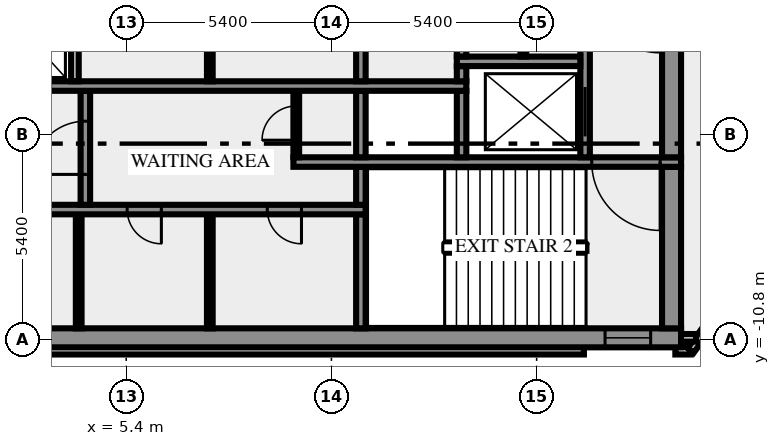
"""IFC4 building model, lengths in metres.
Left out: names, types, materials, properties, quantities, classifications, styles, units other than length and angle.
Written with IfcOpenShell. Run it as: python <this file> out.ifc"""

import sys

from ifc_helpers import new_model, si_unit, direction, frame, frame_2d, origin, place, context, subcontext, project, spatial, rectangle, extrude, element, fill, save


model = new_model("IFC4")
c1 = context("Model", 3, precision=1e-05, world=origin(), true_north=direction((0.0, 1.0)))
c2 = subcontext(c1, "Body", "Model", "MODEL_VIEW")
j1 = project(units=[si_unit("LENGTHUNIT", "METRE"), si_unit("PLANEANGLEUNIT", "RADIAN")], contexts=[c1])
p1 = place(None, origin())
s1 = spatial("IfcSite", under=j1, at=p1, CompositionType="ELEMENT")
p2 = place(p1, origin())
s2 = spatial("IfcBuilding", under=s1, at=p2, CompositionType="ELEMENT")
p3 = place(p2, frame((0.0, 0.0, 253.0)))
s3 = spatial("IfcBuildingStorey", under=s2, at=p3, CompositionType="ELEMENT", Elevation=253.0)
p4 = place(p3, frame((-17.444, -11.088, 0.0), z_axis=(0.0, 0.0, 1.0), x_axis=(1.0, 0.0, 0.0)))
e1 = element("IfcWall", 1, at=p4, inside=s3, PredefinedType="SOLIDWALL", context=c2, shape_type="SweptSolid", body=[
    extrude(rectangle(XDim=34.888, YDim=0.2, at=frame_2d((17.444, 0.0))), origin(), (0.0, 0.0, 1.0), 3.65),
])
p5 = place(p3, frame((19.85, -11.088, 0.0), z_axis=(0.0, 0.0, 1.0), x_axis=(1.0, 0.0, 0.0)))
e2 = element("IfcWall", 2, at=p5, inside=s3, PredefinedType="SOLIDWALL", context=c2, shape_type="SweptSolid", body=[
    extrude(rectangle(XDim=0.406, YDim=0.2, at=frame_2d((0.203, 0.0))), origin(), (0.0, 0.0, 1.0), 3.65),
])
p6 = place(p3, frame((20.253, -11.083, 0.0), z_axis=(0.0, 0.0, 1.0), x_axis=(0.587766567315, 0.809030569476, 0.0)))
e3 = element("IfcWall", 3, at=p6, inside=s3, PredefinedType="SOLIDWALL", context=c2, shape_type="SweptSolid", body=[
    extrude(rectangle(XDim=2.688, YDim=0.2, at=frame_2d((1.344, 0.0))), origin(), (0.0, 0.0, 1.0), 3.65),
])
p7 = place(p3, frame((19.98, -10.75, 0.0), z_axis=(0.0, 0.0, 1.0), x_axis=(1.0, 0.0, 0.0)))
e4 = element("IfcWall", 4, at=p7, inside=s3, PredefinedType="SOLIDWALL", context=c2, shape_type="SweptSolid", body=[
    extrude(rectangle(XDim=0.417, YDim=0.2, at=frame_2d((0.208, 0.0))), origin(), (0.0, 0.0, 1.0), 3.65),
])
p8 = place(p3, frame((-20.0, -10.75, 0.0), z_axis=(0.0, 0.0, 1.0), x_axis=(1.0, 0.0, 0.0)))
e5 = element("IfcWall", 5, at=p8, inside=s3, PredefinedType="SHEAR", context=c2, shape_type="SweptSolid", body=[
    extrude(rectangle(XDim=40.0, YDim=0.5, at=frame_2d((20.0, 0.0))), origin(), (0.0, 0.0, 1.0), 3.65),
])
p9 = place(p8, frame((0.8, 0.0, 1.0)))
e6 = element("IfcOpeningElement", 6, at=p9, cuts=e5, PredefinedType="OPENING", context=c2, shape_type="SweptSolid", body=[
    extrude(rectangle(XDim=1.2, YDim=1.2, at=frame_2d((0.6, 0.6))), frame((0.0, 0.26, 0.0), z_axis=(0.0, -1.0, 0.0), x_axis=(1.0, 0.0, 0.0)), (0.0, 0.0, 1.0), 0.52),
])
p10 = place(p8, frame((38.0, 0.0, 1.0)))
e7 = element("IfcOpeningElement", 7, at=p10, cuts=e5, PredefinedType="OPENING", context=c2, shape_type="SweptSolid", body=[
    extrude(rectangle(XDim=1.2, YDim=1.2, at=frame_2d((0.6, 0.6))), frame((0.0, 0.26, 0.0), z_axis=(0.0, -1.0, 0.0), x_axis=(1.0, 0.0, 0.0)), (0.0, 0.0, 1.0), 0.52),
])
for number, where, z_axis, x_axis in (
    (8, (4.15, -10.5, 0.0), (0.0, 0.0, 1.0), (0.0, 1.0, 0.0)),
    (9, (7.6, -10.5, 0.0), (0.0, 0.0, 1.0), (0.0, 1.0, 0.0)),
):
    element("IfcWall", number, at=place(p3, frame(where, z_axis=z_axis, x_axis=x_axis)), inside=s3, PredefinedType="PARTITIONING", context=c2, shape_type="SweptSolid", body=[
        extrude(rectangle(XDim=3.0, YDim=0.15, at=frame_2d((1.5, 0.0))), origin(), (0.0, 0.0, 1.0), 3.65),
    ])
p11 = place(p3, frame((11.575, -10.5, 0.0), z_axis=(0.0, 0.0, 1.0), x_axis=(0.0, 1.0, 0.0)))
e10 = element("IfcWall", 10, at=p11, inside=s3, PredefinedType="SHEAR", context=c2, shape_type="SweptSolid", body=[
    extrude(rectangle(XDim=3.0, YDim=0.25, at=frame_2d((1.5, 0.0))), origin(), (0.0, 0.0, 1.0), 3.65),
])
p12 = place(p3, frame((19.75, -10.5, 0.0), z_axis=(0.0, 0.0, 1.0), x_axis=(0.0, 1.0, 0.0)))
e11 = element("IfcWall", 11, at=p12, inside=s3, PredefinedType="SHEAR", context=c2, shape_type="SweptSolid", body=[
    extrude(rectangle(XDim=4.25, YDim=0.5, at=frame_2d((2.125, 0.0))), origin(), (0.0, 0.0, 1.0), 3.65),
])
p13 = place(p3, frame((11.7, -7.375, 0.0), z_axis=(0.0, 0.0, 1.0), x_axis=(-1.0, 0.0, 0.0)))
e12 = element("IfcWall", 12, at=p13, inside=s3, PredefinedType="SHEAR", context=c2, shape_type="SweptSolid", body=[
    extrude(rectangle(XDim=23.4, YDim=0.25, at=frame_2d((11.7, 0.0))), origin(), (0.0, 0.0, 1.0), 3.65),
])
p14 = place(p13, frame((22.225, 0.0, 0.0)))
e13 = element("IfcOpeningElement", 13, at=p14, cuts=e12, PredefinedType="OPENING", context=c2, shape_type="SweptSolid", body=[
    extrude(rectangle(XDim=0.8, YDim=2.1, at=frame_2d((0.4, 1.05))), frame((0.0, 0.135, 0.0), z_axis=(0.0, -1.0, 0.0), x_axis=(1.0, 0.0, 0.0)), (0.0, 0.0, 1.0), 0.27),
])
p15 = place(p13, frame((20.2, 0.0, 0.0)))
e14 = element("IfcOpeningElement", 14, at=p15, cuts=e12, PredefinedType="OPENING", context=c2, shape_type="SweptSolid", body=[
    extrude(rectangle(XDim=1.1, YDim=2.1, at=frame_2d((0.55, 1.05))), frame((0.0, 0.135, 0.0), z_axis=(0.0, -1.0, 0.0), x_axis=(1.0, 0.0, 0.0)), (0.0, 0.0, 1.0), 0.27),
])
p16 = place(p13, frame((17.7, 0.0, 0.0)))
e15 = element("IfcOpeningElement", 15, at=p16, cuts=e12, PredefinedType="OPENING", context=c2, shape_type="SweptSolid", body=[
    extrude(rectangle(XDim=1.1, YDim=2.1, at=frame_2d((0.55, 1.05))), frame((0.0, 0.135, 0.0), z_axis=(0.0, -1.0, 0.0), x_axis=(1.0, 0.0, 0.0)), (0.0, 0.0, 1.0), 0.27),
])
p17 = place(p13, frame((15.975, 0.0, 0.0)))
e16 = element("IfcOpeningElement", 16, at=p17, cuts=e12, PredefinedType="OPENING", context=c2, shape_type="SweptSolid", body=[
    extrude(rectangle(XDim=0.8, YDim=2.1, at=frame_2d((0.4, 1.05))), frame((0.0, 0.135, 0.0), z_axis=(0.0, -1.0, 0.0), x_axis=(1.0, 0.0, 0.0)), (0.0, 0.0, 1.0), 0.27),
])
p18 = place(p13, frame((14.75, 0.0, 0.0)))
e17 = element("IfcOpeningElement", 17, at=p18, cuts=e12, PredefinedType="OPENING", context=c2, shape_type="SweptSolid", body=[
    extrude(rectangle(XDim=0.7, YDim=2.1, at=frame_2d((0.35, 1.05))), frame((0.0, 0.135, 0.0), z_axis=(0.0, -1.0, 0.0), x_axis=(1.0, 0.0, 0.0)), (0.0, 0.0, 1.0), 0.27),
])
p19 = place(p13, frame((13.35, 0.0, 0.0)))
e18 = element("IfcOpeningElement", 18, at=p19, cuts=e12, PredefinedType="OPENING", context=c2, shape_type="SweptSolid", body=[
    extrude(rectangle(XDim=0.9, YDim=2.1, at=frame_2d((0.45, 1.05))), frame((0.0, 0.135, 0.0), z_axis=(0.0, -1.0, 0.0), x_axis=(1.0, 0.0, 0.0)), (0.0, 0.0, 1.0), 0.27),
])
p20 = place(p13, frame((11.975, 0.0, 0.0)))
e19 = element("IfcOpeningElement", 19, at=p20, cuts=e12, PredefinedType="OPENING", context=c2, shape_type="SweptSolid", body=[
    extrude(rectangle(XDim=0.9, YDim=2.1, at=frame_2d((0.45, 1.05))), frame((0.0, 0.135, 0.0), z_axis=(0.0, -1.0, 0.0), x_axis=(1.0, 0.0, 0.0)), (0.0, 0.0, 1.0), 0.27),
])
p21 = place(p13, frame((10.5, 0.0, 0.0)))
e20 = element("IfcOpeningElement", 20, at=p21, cuts=e12, PredefinedType="OPENING", context=c2, shape_type="SweptSolid", body=[
    extrude(rectangle(XDim=0.9, YDim=2.1, at=frame_2d((0.45, 1.05))), frame((0.0, 0.135, 0.0), z_axis=(0.0, -1.0, 0.0), x_axis=(1.0, 0.0, 0.0)), (0.0, 0.0, 1.0), 0.27),
])
p22 = place(p13, frame((8.388, 0.0, 0.0)))
e21 = element("IfcOpeningElement", 21, at=p22, cuts=e12, PredefinedType="OPENING", context=c2, shape_type="SweptSolid", body=[
    extrude(rectangle(XDim=0.9, YDim=2.1, at=frame_2d((0.45, 1.05))), frame((0.0, 0.135, 0.0), z_axis=(0.0, -1.0, 0.0), x_axis=(1.0, 0.0, 0.0)), (0.0, 0.0, 1.0), 0.27),
])
p23 = place(p13, frame((5.375, 0.0, 0.0)))
e22 = element("IfcOpeningElement", 22, at=p23, cuts=e12, PredefinedType="OPENING", context=c2, shape_type="SweptSolid", body=[
    extrude(rectangle(XDim=0.9, YDim=2.1, at=frame_2d((0.45, 1.05))), frame((0.0, 0.135, 0.0), z_axis=(0.0, -1.0, 0.0), x_axis=(1.0, 0.0, 0.0)), (0.0, 0.0, 1.0), 0.27),
])
p24 = place(p13, frame((1.688, 0.0, 0.0)))
e23 = element("IfcOpeningElement", 23, at=p24, cuts=e12, PredefinedType="OPENING", context=c2, shape_type="SweptSolid", body=[
    extrude(rectangle(XDim=0.9, YDim=2.1, at=frame_2d((0.45, 1.05))), frame((0.0, 0.135, 0.0), z_axis=(0.0, -1.0, 0.0), x_axis=(1.0, 0.0, 0.0)), (0.0, 0.0, 1.0), 0.27),
])
p25 = place(p3, frame((4.325, -7.25, 0.0), z_axis=(0.0, 0.0, 1.0), x_axis=(0.0, 1.0, 0.0)))
e24 = element("IfcWall", 24, at=p25, inside=s3, PredefinedType="SHEAR", context=c2, shape_type="SweptSolid", body=[
    extrude(rectangle(XDim=3.0, YDim=0.25, at=frame_2d((1.5, 0.0))), origin(), (0.0, 0.0, 1.0), 3.65),
])
p26 = place(p25, frame((0.8, 0.0, 0.0)))
e25 = element("IfcOpeningElement", 25, at=p26, cuts=e24, PredefinedType="OPENING", context=c2, shape_type="SweptSolid", body=[
    extrude(rectangle(XDim=1.4, YDim=2.1, at=frame_2d((0.7, 1.05))), frame((0.0, 0.135, 0.0), z_axis=(0.0, -1.0, 0.0), x_axis=(1.0, 0.0, 0.0)), (0.0, 0.0, 1.0), 0.27),
])
p27 = place(p3, frame((11.575, -7.25, 0.0), z_axis=(0.0, 0.0, 1.0), x_axis=(0.0, 1.0, 0.0)))
e26 = element("IfcWall", 26, at=p27, inside=s3, PredefinedType="SHEAR", context=c2, shape_type="SweptSolid", body=[
    extrude(rectangle(XDim=1.0, YDim=0.25, at=frame_2d((0.5, 0.0))), origin(), (0.0, 0.0, 1.0), 3.65),
])
p28 = place(p3, frame((20.0, -6.125, 0.0), z_axis=(0.0, 0.0, 1.0), x_axis=(-1.0, 0.0, 0.0)))
e27 = element("IfcWall", 27, at=p28, inside=s3, PredefinedType="SHEAR", context=c2, shape_type="SweptSolid", body=[
    extrude(rectangle(XDim=10.2, YDim=0.25, at=frame_2d((5.1, 0.0))), origin(), (0.0, 0.0, 1.0), 3.65),
])
p29 = place(p28, frame((0.55, 0.0, 0.0)))
e28 = element("IfcOpeningElement", 28, at=p29, cuts=e27, PredefinedType="OPENING", context=c2, shape_type="SweptSolid", body=[
    extrude(rectangle(XDim=1.8, YDim=2.1, at=frame_2d((0.9, 1.05))), frame((0.0, 0.135, 0.0), z_axis=(0.0, -1.0, 0.0), x_axis=(1.0, 0.0, 0.0)), (0.0, 0.0, 1.0), 0.27),
])
p30 = place(p3, frame((9.875, -6.0, 0.0), z_axis=(0.0, 0.0, 1.0), x_axis=(0.0, 1.0, 0.0)))
e29 = element("IfcWall", 29, at=p30, inside=s3, PredefinedType="PARTITIONING", context=c2, shape_type="SweptSolid", body=[
    extrude(rectangle(XDim=1.75, YDim=0.15, at=frame_2d((0.875, 0.0))), origin(), (0.0, 0.0, 1.0), 3.65),
])
p31 = place(p30, frame((0.45, 0.0, 0.0)))
e30 = element("IfcOpeningElement", 30, at=p31, cuts=e29, PredefinedType="OPENING", context=c2, shape_type="SweptSolid", body=[
    extrude(rectangle(XDim=0.9, YDim=2.1, at=frame_2d((0.45, 1.05))), frame((0.0, 0.085, 0.0), z_axis=(0.0, -1.0, 0.0), x_axis=(1.0, 0.0, 0.0)), (0.0, 0.0, 1.0), 0.17),
])
for number, where, z_axis, x_axis in (
    (31, (11.575, -6.0, 0.0), (0.0, 0.0, 1.0), (0.0, 1.0, 0.0)),
    (32, (14.225, -6.0, 0.0), (0.0, 0.0, 1.0), (0.0, 1.0, 0.0)),
):
    element("IfcWall", number, at=place(p3, frame(where, z_axis=z_axis, x_axis=x_axis)), inside=s3, PredefinedType="SHEAR", context=c2, shape_type="SweptSolid", body=[
        extrude(rectangle(XDim=1.75, YDim=0.25, at=frame_2d((0.875, 0.0))), origin(), (0.0, 0.0, 1.0), 3.65),
    ])
p32 = place(p3, frame((17.475, -6.0, 0.0), z_axis=(0.0, 0.0, 1.0), x_axis=(0.0, 1.0, 0.0)))
e33 = element("IfcWall", 33, at=p32, inside=s3, PredefinedType="SHEAR", context=c2, shape_type="SweptSolid", body=[
    extrude(rectangle(XDim=4.3, YDim=0.25, at=frame_2d((2.15, 0.0))), origin(), (0.0, 0.0, 1.0), 3.65),
])
p33 = place(p32, frame((0.55, 0.0, 0.0)))
e34 = element("IfcOpeningElement", 34, at=p33, cuts=e33, PredefinedType="OPENING", context=c2, shape_type="SweptSolid", body=[
    extrude(rectangle(XDim=1.3, YDim=2.1, at=frame_2d((0.65, 1.05))), frame((0.0, 0.135, 0.0), z_axis=(0.0, -1.0, 0.0), x_axis=(1.0, 0.0, 0.0)), (0.0, 0.0, 1.0), 0.27),
])
p34 = place(p3, frame((19.75, -6.0, 0.0), z_axis=(0.0, 0.0, 1.0), x_axis=(0.0, 1.0, 0.0)))
e35 = element("IfcWall", 35, at=p34, inside=s3, PredefinedType="SHEAR", context=c2, shape_type="SweptSolid", body=[
    extrude(rectangle(XDim=4.3, YDim=0.5, at=frame_2d((2.15, 0.0))), origin(), (0.0, 0.0, 1.0), 3.65),
])
p35 = place(p3, frame((-0.6, -4.125, 0.0), z_axis=(0.0, 0.0, 1.0), x_axis=(1.0, 0.0, 0.0)))
e36 = element("IfcWall", 36, at=p35, inside=s3, PredefinedType="SHEAR", context=c2, shape_type="SweptSolid", body=[
    extrude(rectangle(XDim=14.95, YDim=0.25, at=frame_2d((7.475, 0.0))), origin(), (0.0, 0.0, 1.0), 3.65),
])
p36 = place(p35, frame((2.75, 0.0, 0.0)))
e37 = element("IfcOpeningElement", 37, at=p36, cuts=e36, PredefinedType="OPENING", context=c2, shape_type="SweptSolid", body=[
    extrude(rectangle(XDim=1.3, YDim=2.1, at=frame_2d((0.65, 1.05))), frame((0.0, 0.135, 0.0), z_axis=(0.0, -1.0, 0.0), x_axis=(1.0, 0.0, 0.0)), (0.0, 0.0, 1.0), 0.27),
])
p37 = place(p3, frame((4.05, -4.0, 0.0), z_axis=(0.0, 0.0, 1.0), x_axis=(0.0, 1.0, 0.0)))
e38 = element("IfcWall", 38, at=p37, inside=s3, PredefinedType="SOLIDWALL", context=c2, shape_type="SweptSolid", body=[
    extrude(rectangle(XDim=2.3, YDim=0.2, at=frame_2d((1.15, 0.0))), origin(), (0.0, 0.0, 1.0), 3.65),
])
p38 = place(p3, frame((7.6, -4.0, 0.0), z_axis=(0.0, 0.0, 1.0), x_axis=(0.0, 1.0, 0.0)))
e39 = element("IfcWall", 39, at=p38, inside=s3, PredefinedType="PARTITIONING", context=c2, shape_type="SweptSolid", body=[
    extrude(rectangle(XDim=2.3, YDim=0.15, at=frame_2d((1.15, 0.0))), origin(), (0.0, 0.0, 1.0), 3.65),
])
p39 = place(p3, frame((11.575, -4.0, 0.0), z_axis=(0.0, 0.0, 1.0), x_axis=(0.0, 1.0, 0.0)))
e40 = element("IfcWall", 40, at=p39, inside=s3, PredefinedType="SHEAR", context=c2, shape_type="SweptSolid", body=[
    extrude(rectangle(XDim=2.3, YDim=0.25, at=frame_2d((1.15, 0.0))), origin(), (0.0, 0.0, 1.0), 3.65),
])
p40 = place(p3, frame((14.225, -4.0, 0.0), z_axis=(0.0, 0.0, 1.0), x_axis=(0.0, 1.0, 0.0)))
e41 = element("IfcWall", 41, at=p40, inside=s3, PredefinedType="SHEAR", context=c2, shape_type="SweptSolid", body=[
    extrude(rectangle(XDim=0.4, YDim=0.25, at=frame_2d((0.2, 0.0))), origin(), (0.0, 0.0, 1.0), 3.65),
])
p41 = place(p3, frame((14.1, -3.475, 0.0), z_axis=(0.0, 0.0, 1.0), x_axis=(1.0, 0.0, 0.0)))
e42 = element("IfcWall", 42, at=p41, inside=s3, PredefinedType="SHEAR", context=c2, shape_type="SweptSolid", body=[
    extrude(rectangle(XDim=3.25, YDim=0.25, at=frame_2d((1.625, 0.0))), origin(), (0.0, 0.0, 1.0), 3.65),
])
p42 = place(p3, frame((14.225, -3.35, 0.0), z_axis=(0.0, 0.0, 1.0), x_axis=(0.0, 1.0, 0.0)))
e43 = element("IfcWall", 43, at=p42, inside=s3, PredefinedType="SHEAR", context=c2, shape_type="SweptSolid", body=[
    extrude(rectangle(XDim=1.65, YDim=0.25, at=frame_2d((0.825, 0.0))), origin(), (0.0, 0.0, 1.0), 3.65),
])
p43 = place(p3, frame((15.85, -3.35, 0.0), z_axis=(0.0, 0.0, 1.0), x_axis=(0.0, 1.0, 0.0)))
e44 = element("IfcWall", 44, at=p43, inside=s3, PredefinedType="PARTITIONING", context=c2, shape_type="SweptSolid", body=[
    extrude(rectangle(XDim=1.65, YDim=0.15, at=frame_2d((0.825, 0.0))), origin(), (0.0, 0.0, 1.0), 3.65),
])
p44 = place(p10, origin())
e45 = element("IfcWindow", 45, at=p44, inside=s3, PartitioningType="SINGLE_PANEL", PredefinedType="WINDOW", context=c2, shape_type="SweptSolid", body=[
    extrude(rectangle(XDim=1.2, YDim=1.2, at=frame_2d((0.6, 0.6))), frame((0.0, 0.03, 0.0), z_axis=(0.0, -1.0, 0.0), x_axis=(1.0, 0.0, 0.0)), (0.0, 0.0, 1.0), 0.06),
])
fill(e7, e45)
p45 = place(p23, origin())
e46 = element("IfcDoor", 46, at=p45, inside=s3, OperationType="SINGLE_SWING_LEFT", PredefinedType="DOOR", context=c2, shape_type="SweptSolid", body=[
    extrude(rectangle(XDim=0.9, YDim=2.1, at=frame_2d((0.45, 1.05))), frame((0.0, 0.025, 0.0), z_axis=(0.0, -1.0, 0.0), x_axis=(1.0, 0.0, 0.0)), (0.0, 0.0, 1.0), 0.05),
])
fill(e22, e46)
p46 = place(p24, origin())
e47 = element("IfcDoor", 47, at=p46, inside=s3, OperationType="SINGLE_SWING_LEFT", PredefinedType="DOOR", context=c2, shape_type="SweptSolid", body=[
    extrude(rectangle(XDim=0.9, YDim=2.1, at=frame_2d((0.45, 1.05))), frame((0.0, 0.025, 0.0), z_axis=(0.0, -1.0, 0.0), x_axis=(1.0, 0.0, 0.0)), (0.0, 0.0, 1.0), 0.05),
])
fill(e23, e47)
p47 = place(p26, origin())
e48 = element("IfcDoor", 48, at=p47, inside=s3, OperationType="DOUBLE_DOOR_SINGLE_SWING", PredefinedType="DOOR", context=c2, shape_type="SweptSolid", body=[
    extrude(rectangle(XDim=1.4, YDim=2.1, at=frame_2d((0.7, 1.05))), frame((0.0, 0.025, 0.0), z_axis=(0.0, -1.0, 0.0), x_axis=(1.0, 0.0, 0.0)), (0.0, 0.0, 1.0), 0.05),
])
fill(e25, e48)
p48 = place(p29, origin())
e49 = element("IfcDoor", 49, at=p48, inside=s3, OperationType="DOUBLE_DOOR_SINGLE_SWING", PredefinedType="DOOR", context=c2, shape_type="SweptSolid", body=[
    extrude(rectangle(XDim=1.8, YDim=2.1, at=frame_2d((0.9, 1.05))), frame((0.0, 0.025, 0.0), z_axis=(0.0, -1.0, 0.0), x_axis=(1.0, 0.0, 0.0)), (0.0, 0.0, 1.0), 0.05),
])
fill(e28, e49)
p49 = place(p31, origin())
e50 = element("IfcDoor", 50, at=p49, inside=s3, OperationType="SINGLE_SWING_RIGHT", PredefinedType="DOOR", context=c2, shape_type="SweptSolid", body=[
    extrude(rectangle(XDim=0.9, YDim=2.1, at=frame_2d((0.45, 1.05))), frame((0.0, 0.025, 0.0), z_axis=(0.0, -1.0, 0.0), x_axis=(1.0, 0.0, 0.0)), (0.0, 0.0, 1.0), 0.05),
])
fill(e30, e50)
p50 = place(p33, origin())
e51 = element("IfcDoor", 51, at=p50, inside=s3, OperationType="DOUBLE_DOOR_SLIDING", PredefinedType="DOOR", context=c2, shape_type="SweptSolid", body=[
    extrude(rectangle(XDim=1.3, YDim=2.1, at=frame_2d((0.65, 1.05))), frame((0.0, 0.025, 0.0), z_axis=(0.0, -1.0, 0.0), x_axis=(1.0, 0.0, 0.0)), (0.0, 0.0, 1.0), 0.05),
])
fill(e34, e51)
save(model, sys.argv[1])
